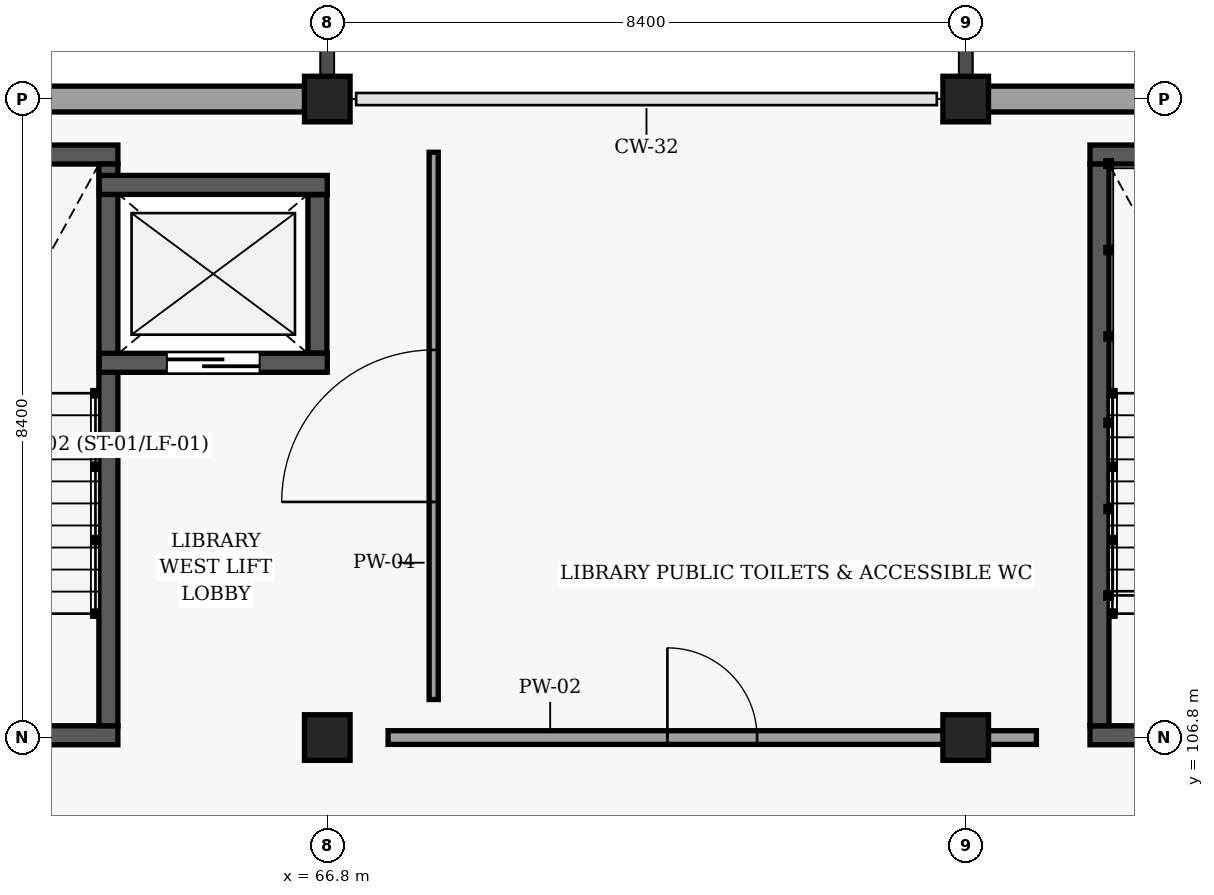
"""IFC4 building model, lengths in metres.
Left out: names, types, materials, properties, quantities, classifications, styles, units other than length and angle.
Written with IfcOpenShell. Run it as: python <this file> out.ifc"""

import sys

from ifc_helpers import new_model, si_unit, direction, frame, frame_2d, origin, origin_2d, place, context, subcontext, project, spatial, rectangle, extrude, element, fill, save


model = new_model("IFC4")
c1 = context("Model", 3, precision=1e-05, world=origin(), true_north=direction((0.0, 1.0)))
c2 = subcontext(c1, "Body", "Model", "MODEL_VIEW")
j1 = project(units=[si_unit("LENGTHUNIT", "METRE"), si_unit("PLANEANGLEUNIT", "RADIAN")], contexts=[c1])
p1 = place(None, origin())
s1 = spatial("IfcSite", under=j1, at=p1, CompositionType="ELEMENT")
p2 = place(p1, origin())
s2 = spatial("IfcBuilding", under=s1, at=p2, CompositionType="ELEMENT")
p3 = place(p2, frame((0.0, 0.0, 12.9)))
s3 = spatial("IfcBuildingStorey", under=s2, at=p3, CompositionType="ELEMENT", Elevation=12.9)
for number, where, z_axis, x_axis in (
    (1, (66.8, 106.8, 0.0), (0.0, 0.0, 1.0), (1.0, 0.0, 0.0)),
    (2, (66.8, 115.2, 0.0), (0.0, 0.0, 1.0), (1.0, 0.0, 0.0)),
    (3, (75.2, 106.8, 0.0), (0.0, 0.0, 1.0), (1.0, 0.0, 0.0)),
    (4, (75.2, 115.2, 0.0), (0.0, 0.0, 1.0), (1.0, 0.0, 0.0)),
):
    element("IfcColumn", number, at=place(p3, frame(where, z_axis=z_axis, x_axis=x_axis)), inside=s3, PredefinedType="COLUMN", context=c2, shape_type="SweptSolid", body=[
        extrude(rectangle(XDim=0.6, YDim=0.6, at=origin_2d()), origin(), (0.0, 0.0, 1.0), 3.6),
    ])
p4 = place(p3, frame((58.5, 115.2, 0.0), z_axis=(0.0, 0.0, 1.0), x_axis=(1.0, 0.0, 0.0)))
e5 = element("IfcWall", 5, at=p4, inside=s3, PredefinedType="SOLIDWALL", context=c2, shape_type="SweptSolid", body=[
    extrude(rectangle(XDim=8.2, YDim=0.34, at=frame_2d((4.1, 0.0))), origin(), (0.0, 0.0, 1.0), 2.885),
])
p5 = place(p3, frame((75.3, 115.2, 0.0), z_axis=(0.0, 0.0, 1.0), x_axis=(1.0, 0.0, 0.0)))
e6 = element("IfcWall", 6, at=p5, inside=s3, PredefinedType="SOLIDWALL", context=c2, shape_type="SweptSolid", body=[
    extrude(rectangle(XDim=8.6, YDim=0.34, at=frame_2d((4.3, 0.0))), origin(), (0.0, 0.0, 1.0), 2.885),
])
p6 = place(p3, frame((64.045, 106.83, 0.0), z_axis=(0.0, 0.0, 1.0), x_axis=(-1.0, 0.0, 0.0)))
e7 = element("IfcWall", 7, at=p6, inside=s3, PredefinedType="SHEAR", context=c2, shape_type="SweptSolid", body=[
    extrude(rectangle(XDim=3.61, YDim=0.25, at=frame_2d((1.805, 0.0))), origin(), (0.0, 0.0, 1.0), 3.38),
])
p7 = place(p6, frame((1.205, 0.0, 0.0)))
e8 = element("IfcOpeningElement", 8, at=p7, cuts=e7, PredefinedType="OPENING", context=c2, shape_type="SweptSolid", body=[
    extrude(rectangle(XDim=1.2, YDim=2.15, at=frame_2d((0.6, 1.075))), frame((0.0, 0.135, 0.0), z_axis=(0.0, -1.0, 0.0), x_axis=(1.0, 0.0, 0.0)), (0.0, 0.0, 1.0), 0.27),
])
p8 = place(p3, frame((60.435, 114.47, 0.0), z_axis=(0.0, 0.0, 1.0), x_axis=(1.0, 0.0, 0.0)))
e9 = element("IfcWall", 9, at=p8, inside=s3, PredefinedType="SHEAR", context=c2, shape_type="SweptSolid", body=[
    extrude(rectangle(XDim=3.61, YDim=0.25, at=frame_2d((1.805, 0.0))), origin(), (0.0, 0.0, 1.0), 3.38),
])
p9 = place(p3, frame((63.92, 114.345, 0.0), z_axis=(0.0, 0.0, 1.0), x_axis=(0.0, -1.0, 0.0)))
e10 = element("IfcWall", 10, at=p9, inside=s3, PredefinedType="SHEAR", context=c2, shape_type="SweptSolid", body=[
    extrude(rectangle(XDim=7.39, YDim=0.25, at=frame_2d((3.695, 0.0))), origin(), (0.0, 0.0, 1.0), 3.38),
])
p10 = place(p3, frame((63.8, 111.73, 0.0), z_axis=(0.0, 0.0, 1.0), x_axis=(1.0, 0.0, 0.0)))
e11 = element("IfcWall", 11, at=p10, inside=s3, PredefinedType="SHEAR", context=c2, shape_type="SweptSolid", body=[
    extrude(rectangle(XDim=3.0, YDim=0.25, at=frame_2d((1.5, 0.0))), origin(), (0.0, 0.0, 1.0), 3.38),
])
p11 = place(p10, frame((0.89, 0.0, 0.0)))
e12 = element("IfcOpeningElement", 12, at=p11, cuts=e11, PredefinedType="OPENING", context=c2, shape_type="SweptSolid", body=[
    extrude(rectangle(XDim=1.22, YDim=2.18, at=frame_2d((0.61, 1.09))), frame((0.0, 0.135, 0.0), z_axis=(0.0, -1.0, 0.0), x_axis=(1.0, 0.0, 0.0)), (0.0, 0.0, 1.0), 0.27),
])
p12 = place(p3, frame((66.8, 114.07, 0.0), z_axis=(0.0, 0.0, 1.0), x_axis=(-1.0, 0.0, 0.0)))
e13 = element("IfcWall", 13, at=p12, inside=s3, PredefinedType="SHEAR", context=c2, shape_type="SweptSolid", body=[
    extrude(rectangle(XDim=3.0, YDim=0.25, at=frame_2d((1.5, 0.0))), origin(), (0.0, 0.0, 1.0), 3.38),
])
p13 = place(p3, frame((66.67, 111.86, 0.0), z_axis=(0.0, 0.0, 1.0), x_axis=(0.0, 1.0, 0.0)))
e14 = element("IfcWall", 14, at=p13, inside=s3, PredefinedType="SHEAR", context=c2, shape_type="SweptSolid", body=[
    extrude(rectangle(XDim=2.08, YDim=0.25, at=frame_2d((1.04, 0.0))), origin(), (0.0, 0.0, 1.0), 3.38),
])
p14 = place(p3, frame((80.445, 106.83, 0.0), z_axis=(0.0, 0.0, 1.0), x_axis=(-1.0, 0.0, 0.0)))
e15 = element("IfcWall", 15, at=p14, inside=s3, PredefinedType="SHEAR", context=c2, shape_type="SweptSolid", body=[
    extrude(rectangle(XDim=3.61, YDim=0.25, at=frame_2d((1.805, 0.0))), origin(), (0.0, 0.0, 1.0), 3.38),
])
p15 = place(p14, frame((1.235, 0.0, 0.0)))
e16 = element("IfcOpeningElement", 16, at=p15, cuts=e15, PredefinedType="OPENING", context=c2, shape_type="SweptSolid", body=[
    extrude(rectangle(XDim=1.14, YDim=2.15, at=frame_2d((0.57, 1.075))), frame((0.0, 0.135, 0.0), z_axis=(0.0, -1.0, 0.0), x_axis=(1.0, 0.0, 0.0)), (0.0, 0.0, 1.0), 0.27),
])
p16 = place(p3, frame((76.835, 114.47, 0.0), z_axis=(0.0, 0.0, 1.0), x_axis=(1.0, 0.0, 0.0)))
e17 = element("IfcWall", 17, at=p16, inside=s3, PredefinedType="SHEAR", context=c2, shape_type="SweptSolid", body=[
    extrude(rectangle(XDim=3.61, YDim=0.25, at=frame_2d((1.805, 0.0))), origin(), (0.0, 0.0, 1.0), 3.38),
])
p17 = place(p3, frame((76.96, 106.955, 0.0), z_axis=(0.0, 0.0, 1.0), x_axis=(0.0, 1.0, 0.0)))
e18 = element("IfcWall", 18, at=p17, inside=s3, PredefinedType="SHEAR", context=c2, shape_type="SweptSolid", body=[
    extrude(rectangle(XDim=7.39, YDim=0.25, at=frame_2d((3.695, 0.0))), origin(), (0.0, 0.0, 1.0), 3.38),
])
p18 = place(p3, frame((67.6, 106.8, 0.0), z_axis=(0.0, 0.0, 1.0), x_axis=(1.0, 0.0, 0.0)))
e19 = element("IfcWall", 19, at=p18, inside=s3, PredefinedType="PARTITIONING", context=c2, shape_type="SweptSolid", body=[
    extrude(rectangle(XDim=8.53, YDim=0.18, at=frame_2d((4.265, 0.0))), origin(), (0.0, 0.0, 1.0), 2.615),
])
p19 = place(p18, frame((3.675, 0.0, 0.0)))
e20 = element("IfcOpeningElement", 20, at=p19, cuts=e19, PredefinedType="OPENING", context=c2, shape_type="SweptSolid", body=[
    extrude(rectangle(XDim=1.18, YDim=2.18, at=frame_2d((0.59, 1.09))), frame((0.0, 0.1, 0.0), z_axis=(0.0, -1.0, 0.0), x_axis=(1.0, 0.0, 0.0)), (0.0, 0.0, 1.0), 0.2),
])
p20 = place(p3, frame((68.2, 107.3, 0.0), z_axis=(0.0, 0.0, 1.0), x_axis=(0.0, 1.0, 0.0)))
e21 = element("IfcWall", 21, at=p20, inside=s3, PredefinedType="PARTITIONING", context=c2, shape_type="SweptSolid", body=[
    extrude(rectangle(XDim=7.2, YDim=0.12, at=frame_2d((3.6, 0.0))), origin(), (0.0, 0.0, 1.0), 3.365),
])
p21 = place(p20, frame((2.6, 0.0, 0.0)))
e22 = element("IfcOpeningElement", 22, at=p21, cuts=e21, PredefinedType="OPENING", context=c2, shape_type="SweptSolid", body=[
    extrude(rectangle(XDim=2.0, YDim=2.3, at=frame_2d((1.0, 1.15))), frame((0.0, 0.07, 0.0), z_axis=(0.0, -1.0, 0.0), x_axis=(1.0, 0.0, 0.0)), (0.0, 0.0, 1.0), 0.14),
])
p22 = place(p11, origin())
e23 = element("IfcDoor", 23, at=p22, inside=s3, OperationType="SLIDING_TO_RIGHT", PredefinedType="DOOR", context=c2, shape_type="SweptSolid", body=[
    extrude(rectangle(XDim=1.22, YDim=2.18, at=frame_2d((0.61, 1.09))), frame((0.0, 0.025, 0.0), z_axis=(0.0, -1.0, 0.0), x_axis=(1.0, 0.0, 0.0)), (0.0, 0.0, 1.0), 0.05),
])
fill(e12, e23)
p23 = place(p19, origin())
e24 = element("IfcDoor", 24, at=p23, inside=s3, OperationType="SINGLE_SWING_LEFT", PredefinedType="DOOR", context=c2, shape_type="SweptSolid", body=[
    extrude(rectangle(XDim=1.18, YDim=2.18, at=frame_2d((0.59, 1.09))), frame((0.0, 0.025, 0.0), z_axis=(0.0, -1.0, 0.0), x_axis=(1.0, 0.0, 0.0)), (0.0, 0.0, 1.0), 0.05),
])
fill(e20, e24)
p24 = place(p21, origin())
e25 = element("IfcDoor", 25, at=p24, inside=s3, OperationType="DOUBLE_DOOR_SINGLE_SWING", PredefinedType="DOOR", context=c2, shape_type="SweptSolid", body=[
    extrude(rectangle(XDim=2.0, YDim=2.3, at=frame_2d((1.0, 1.15))), frame((0.0, 0.025, 0.0), z_axis=(0.0, -1.0, 0.0), x_axis=(1.0, 0.0, 0.0)), (0.0, 0.0, 1.0), 0.05),
])
fill(e22, e25)
save(model, sys.argv[1])
